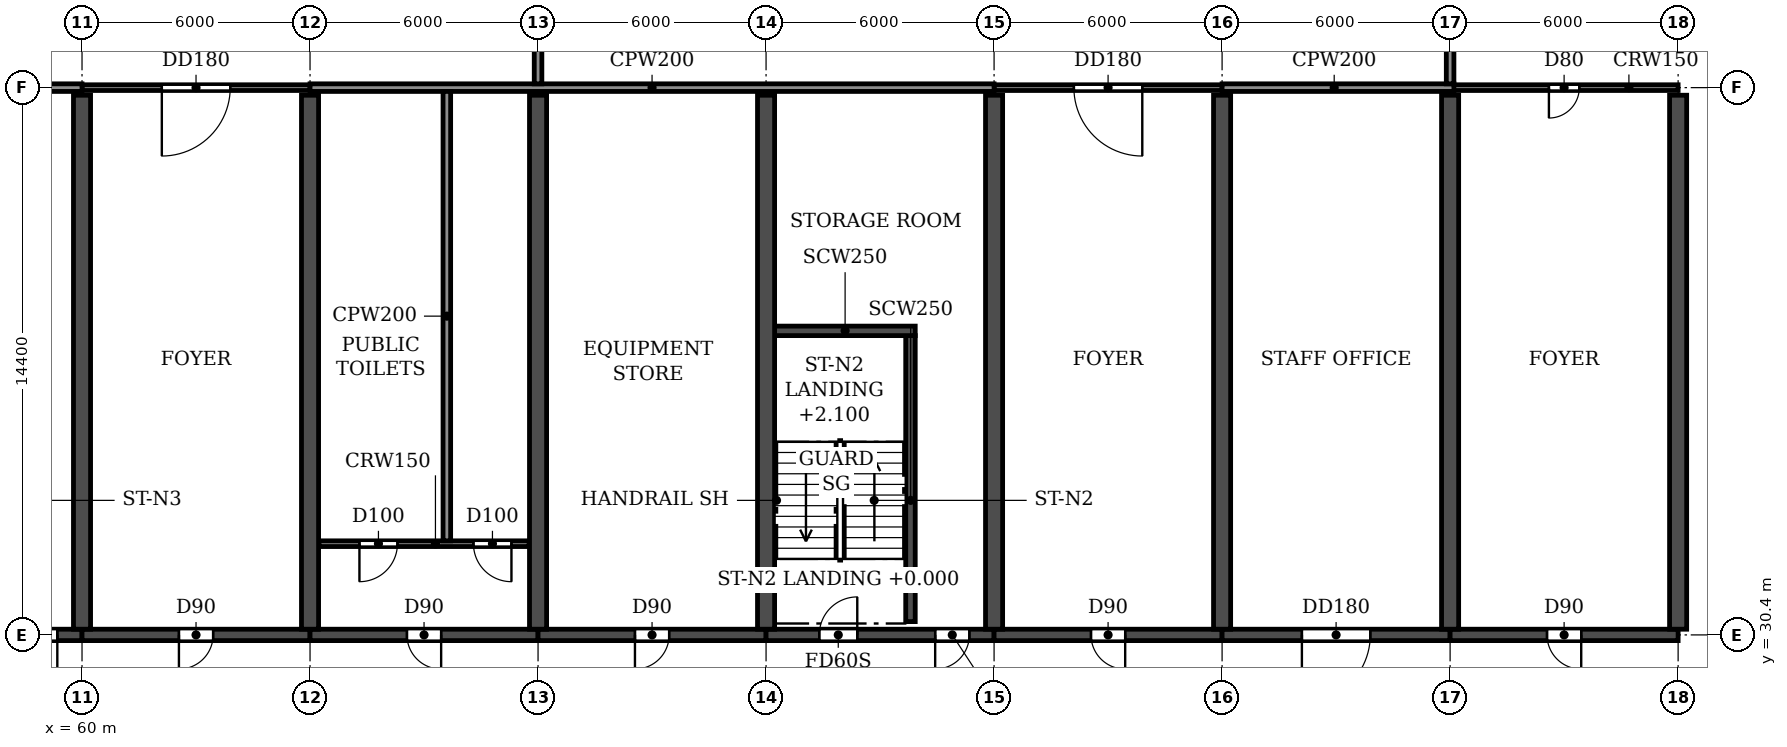
"""IFC4 building model, lengths in metres.
Left out: names, types, materials, properties, quantities, classifications, styles, units other than length and angle.
Written with IfcOpenShell. Run it as: python <this file> out.ifc"""

import sys

from ifc_helpers import new_model, si_unit, direction, frame, frame_2d, origin, place, context, subcontext, project, spatial, rectangle, extrude, element, fill, save


model = new_model("IFC4")
c1 = context("Model", 3, precision=1e-05, world=origin(), true_north=direction((0.0, 1.0)))
c2 = subcontext(c1, "Body", "Model", "MODEL_VIEW")
j1 = project(units=[si_unit("LENGTHUNIT", "METRE"), si_unit("PLANEANGLEUNIT", "RADIAN")], contexts=[c1])
p1 = place(None, origin())
s1 = spatial("IfcSite", under=j1, at=p1, CompositionType="ELEMENT")
p2 = place(p1, origin())
s2 = spatial("IfcBuilding", under=s1, at=p2, CompositionType="ELEMENT")
p3 = place(p2, frame((0.0, 0.0, 10.8)))
s3 = spatial("IfcBuildingStorey", under=s2, at=p3, CompositionType="ELEMENT", Elevation=10.8)
for number, where, z_axis, x_axis in (
    (1, (60.0, 30.55, 0.0), (0.0, 0.0, 1.0), (0.0, 1.0, 0.0)),
    (2, (66.0, 30.55, 0.0), (0.0, 0.0, 1.0), (0.0, 1.0, 0.0)),
    (3, (72.0, 30.55, 0.0), (0.0, 0.0, 1.0), (0.0, 1.0, 0.0)),
    (4, (78.0, 30.55, 0.0), (0.0, 0.0, 1.0), (0.0, 1.0, 0.0)),
    (5, (84.0, 30.55, 0.0), (0.0, 0.0, 1.0), (0.0, 1.0, 0.0)),
    (6, (90.0, 30.55, 0.0), (0.0, 0.0, 1.0), (0.0, 1.0, 0.0)),
    (7, (96.0, 30.55, 0.0), (0.0, 0.0, 1.0), (0.0, 1.0, 0.0)),
    (8, (102.0, 30.55, 0.0), (0.0, 0.0, 1.0), (0.0, 1.0, 0.0)),
):
    element("IfcWall", number, at=place(p3, frame(where, z_axis=z_axis, x_axis=x_axis)), inside=s3, PredefinedType="SHEAR", context=c2, shape_type="SweptSolid", body=[
        extrude(rectangle(XDim=14.05, YDim=0.45, at=frame_2d((7.025, 0.0))), origin(), (0.0, 0.0, 1.0), 3.92),
    ])
p4 = place(p3, frame((54.0, 30.4, 0.0), z_axis=(0.0, 0.0, 1.0), x_axis=(1.0, 0.0, 0.0)))
e9 = element("IfcWall", 9, at=p4, inside=s3, PredefinedType="SHEAR", context=c2, shape_type="SweptSolid", body=[
    extrude(rectangle(XDim=6.0, YDim=0.3, at=frame_2d((3.0, 0.0))), origin(), (0.0, 0.0, 1.0), 3.32),
])
p5 = place(p4, frame((1.4, 0.0, 0.0)))
e10 = element("IfcOpeningElement", 10, at=p5, cuts=e9, PredefinedType="OPENING", context=c2, shape_type="SweptSolid", body=[
    extrude(rectangle(XDim=1.0, YDim=2.1, at=frame_2d((0.5, 1.05))), frame((0.0, 0.16, 0.0), z_axis=(0.0, -1.0, 0.0), x_axis=(1.0, 0.0, 0.0)), (0.0, 0.0, 1.0), 0.32),
])
p6 = place(p4, frame((4.45, 0.0, 0.0)))
e11 = element("IfcOpeningElement", 11, at=p6, cuts=e9, PredefinedType="OPENING", context=c2, shape_type="SweptSolid", body=[
    extrude(rectangle(XDim=0.9, YDim=2.1, at=frame_2d((0.45, 1.05))), frame((0.0, 0.16, 0.0), z_axis=(0.0, -1.0, 0.0), x_axis=(1.0, 0.0, 0.0)), (0.0, 0.0, 1.0), 0.32),
])
p7 = place(p3, frame((60.0, 30.4, 0.0), z_axis=(0.0, 0.0, 1.0), x_axis=(1.0, 0.0, 0.0)))
e12 = element("IfcWall", 12, at=p7, inside=s3, PredefinedType="SHEAR", context=c2, shape_type="SweptSolid", body=[
    extrude(rectangle(XDim=6.0, YDim=0.3, at=frame_2d((3.0, 0.0))), origin(), (0.0, 0.0, 1.0), 3.32),
])
p8 = place(p7, frame((2.55, 0.0, 0.0)))
e13 = element("IfcOpeningElement", 13, at=p8, cuts=e12, PredefinedType="OPENING", context=c2, shape_type="SweptSolid", body=[
    extrude(rectangle(XDim=0.9, YDim=2.1, at=frame_2d((0.45, 1.05))), frame((0.0, 0.16, 0.0), z_axis=(0.0, -1.0, 0.0), x_axis=(1.0, 0.0, 0.0)), (0.0, 0.0, 1.0), 0.32),
])
p9 = place(p3, frame((66.0, 30.4, 0.0), z_axis=(0.0, 0.0, 1.0), x_axis=(1.0, 0.0, 0.0)))
e14 = element("IfcWall", 14, at=p9, inside=s3, PredefinedType="SHEAR", context=c2, shape_type="SweptSolid", body=[
    extrude(rectangle(XDim=6.0, YDim=0.3, at=frame_2d((3.0, 0.0))), origin(), (0.0, 0.0, 1.0), 3.32),
])
p10 = place(p9, frame((2.55, 0.0, 0.0)))
e15 = element("IfcOpeningElement", 15, at=p10, cuts=e14, PredefinedType="OPENING", context=c2, shape_type="SweptSolid", body=[
    extrude(rectangle(XDim=0.9, YDim=2.1, at=frame_2d((0.45, 1.05))), frame((0.0, 0.16, 0.0), z_axis=(0.0, -1.0, 0.0), x_axis=(1.0, 0.0, 0.0)), (0.0, 0.0, 1.0), 0.32),
])
p11 = place(p3, frame((72.0, 30.4, 0.0), z_axis=(0.0, 0.0, 1.0), x_axis=(1.0, 0.0, 0.0)))
e16 = element("IfcWall", 16, at=p11, inside=s3, PredefinedType="SHEAR", context=c2, shape_type="SweptSolid", body=[
    extrude(rectangle(XDim=6.0, YDim=0.3, at=frame_2d((3.0, 0.0))), origin(), (0.0, 0.0, 1.0), 3.32),
])
p12 = place(p11, frame((2.55, 0.0, 0.0)))
e17 = element("IfcOpeningElement", 17, at=p12, cuts=e16, PredefinedType="OPENING", context=c2, shape_type="SweptSolid", body=[
    extrude(rectangle(XDim=0.9, YDim=2.1, at=frame_2d((0.45, 1.05))), frame((0.0, 0.16, 0.0), z_axis=(0.0, -1.0, 0.0), x_axis=(1.0, 0.0, 0.0)), (0.0, 0.0, 1.0), 0.32),
])
p13 = place(p3, frame((78.0, 30.4, 0.0), z_axis=(0.0, 0.0, 1.0), x_axis=(1.0, 0.0, 0.0)))
e18 = element("IfcWall", 18, at=p13, inside=s3, PredefinedType="SHEAR", context=c2, shape_type="SweptSolid", body=[
    extrude(rectangle(XDim=6.0, YDim=0.3, at=frame_2d((3.0, 0.0))), origin(), (0.0, 0.0, 1.0), 3.32),
])
p14 = place(p13, frame((1.4, 0.0, 0.0)))
e19 = element("IfcOpeningElement", 19, at=p14, cuts=e18, PredefinedType="OPENING", context=c2, shape_type="SweptSolid", body=[
    extrude(rectangle(XDim=1.0, YDim=2.1, at=frame_2d((0.5, 1.05))), frame((0.0, 0.16, 0.0), z_axis=(0.0, -1.0, 0.0), x_axis=(1.0, 0.0, 0.0)), (0.0, 0.0, 1.0), 0.32),
])
p15 = place(p13, frame((4.45, 0.0, 0.0)))
e20 = element("IfcOpeningElement", 20, at=p15, cuts=e18, PredefinedType="OPENING", context=c2, shape_type="SweptSolid", body=[
    extrude(rectangle(XDim=0.9, YDim=2.1, at=frame_2d((0.45, 1.05))), frame((0.0, 0.16, 0.0), z_axis=(0.0, -1.0, 0.0), x_axis=(1.0, 0.0, 0.0)), (0.0, 0.0, 1.0), 0.32),
])
p16 = place(p3, frame((84.0, 30.4, 0.0), z_axis=(0.0, 0.0, 1.0), x_axis=(1.0, 0.0, 0.0)))
e21 = element("IfcWall", 21, at=p16, inside=s3, PredefinedType="SHEAR", context=c2, shape_type="SweptSolid", body=[
    extrude(rectangle(XDim=6.0, YDim=0.3, at=frame_2d((3.0, 0.0))), origin(), (0.0, 0.0, 1.0), 3.32),
])
p17 = place(p16, frame((2.55, 0.0, 0.0)))
e22 = element("IfcOpeningElement", 22, at=p17, cuts=e21, PredefinedType="OPENING", context=c2, shape_type="SweptSolid", body=[
    extrude(rectangle(XDim=0.9, YDim=2.1, at=frame_2d((0.45, 1.05))), frame((0.0, 0.16, 0.0), z_axis=(0.0, -1.0, 0.0), x_axis=(1.0, 0.0, 0.0)), (0.0, 0.0, 1.0), 0.32),
])
p18 = place(p3, frame((90.0, 30.4, 0.0), z_axis=(0.0, 0.0, 1.0), x_axis=(1.0, 0.0, 0.0)))
e23 = element("IfcWall", 23, at=p18, inside=s3, PredefinedType="SHEAR", context=c2, shape_type="SweptSolid", body=[
    extrude(rectangle(XDim=6.0, YDim=0.3, at=frame_2d((3.0, 0.0))), origin(), (0.0, 0.0, 1.0), 3.32),
])
p19 = place(p18, frame((2.1, 0.0, 0.0)))
e24 = element("IfcOpeningElement", 24, at=p19, cuts=e23, PredefinedType="OPENING", context=c2, shape_type="SweptSolid", body=[
    extrude(rectangle(XDim=1.8, YDim=2.1, at=frame_2d((0.9, 1.05))), frame((0.0, 0.16, 0.0), z_axis=(0.0, -1.0, 0.0), x_axis=(1.0, 0.0, 0.0)), (0.0, 0.0, 1.0), 0.32),
])
p20 = place(p3, frame((96.0, 30.4, 0.0), z_axis=(0.0, 0.0, 1.0), x_axis=(1.0, 0.0, 0.0)))
e25 = element("IfcWall", 25, at=p20, inside=s3, PredefinedType="SHEAR", context=c2, shape_type="SweptSolid", body=[
    extrude(rectangle(XDim=6.0, YDim=0.3, at=frame_2d((3.0, 0.0))), origin(), (0.0, 0.0, 1.0), 3.32),
])
p21 = place(p20, frame((2.55, 0.0, 0.0)))
e26 = element("IfcOpeningElement", 26, at=p21, cuts=e25, PredefinedType="OPENING", context=c2, shape_type="SweptSolid", body=[
    extrude(rectangle(XDim=0.9, YDim=2.1, at=frame_2d((0.45, 1.05))), frame((0.0, 0.16, 0.0), z_axis=(0.0, -1.0, 0.0), x_axis=(1.0, 0.0, 0.0)), (0.0, 0.0, 1.0), 0.32),
])
p22 = place(p3, frame((81.8, 30.75, 0.0), z_axis=(0.0, 0.0, 1.0), x_axis=(0.0, 1.0, 0.0)))
e27 = element("IfcWall", 27, at=p22, inside=s3, PredefinedType="SOLIDWALL", context=c2, shape_type="SweptSolid", body=[
    extrude(rectangle(XDim=7.525, YDim=0.25, at=frame_2d((3.762, 0.0))), origin(), (0.0, 0.0, 1.0), 3.92),
])
p23 = place(p3, frame((78.0, 38.4, 0.0), z_axis=(0.0, 0.0, 1.0), x_axis=(1.0, 0.0, 0.0)))
e28 = element("IfcWall", 28, at=p23, inside=s3, PredefinedType="SOLIDWALL", context=c2, shape_type="SweptSolid", body=[
    extrude(rectangle(XDim=3.925, YDim=0.25, at=frame_2d((1.962, 0.0))), origin(), (0.0, 0.0, 1.0), 3.92),
])
p24 = place(p3, frame((66.235, 32.8, 0.0), z_axis=(0.0, 0.0, 1.0), x_axis=(1.0, 0.0, 0.0)))
e29 = element("IfcWall", 29, at=p24, inside=s3, PredefinedType="PARTITIONING", context=c2, shape_type="SweptSolid", body=[
    extrude(rectangle(XDim=5.53, YDim=0.15, at=frame_2d((2.765, 0.0))), origin(), (0.0, 0.0, 1.0), 3.92),
])
p25 = place(p24, frame((1.065, 0.0, 0.0)))
e30 = element("IfcOpeningElement", 30, at=p25, cuts=e29, PredefinedType="OPENING", context=c2, shape_type="SweptSolid", body=[
    extrude(rectangle(XDim=1.0, YDim=2.1, at=frame_2d((0.5, 1.05))), frame((0.0, 0.085, 0.0), z_axis=(0.0, -1.0, 0.0), x_axis=(1.0, 0.0, 0.0)), (0.0, 0.0, 1.0), 0.17),
])
p26 = place(p24, frame((4.065, 0.0, 0.0)))
e31 = element("IfcOpeningElement", 31, at=p26, cuts=e29, PredefinedType="OPENING", context=c2, shape_type="SweptSolid", body=[
    extrude(rectangle(XDim=1.0, YDim=2.1, at=frame_2d((0.5, 1.05))), frame((0.0, 0.085, 0.0), z_axis=(0.0, -1.0, 0.0), x_axis=(1.0, 0.0, 0.0)), (0.0, 0.0, 1.0), 0.17),
])
p27 = place(p3, frame((60.0, 44.8, 0.0), z_axis=(0.0, 0.0, 1.0), x_axis=(1.0, 0.0, 0.0)))
e32 = element("IfcWall", 32, at=p27, inside=s3, PredefinedType="PARTITIONING", context=c2, shape_type="SweptSolid", body=[
    extrude(rectangle(XDim=6.0, YDim=0.15, at=frame_2d((3.0, 0.0))), origin(), (0.0, 0.0, 1.0), 3.92),
])
p28 = place(p27, frame((2.1, 0.0, 0.0)))
e33 = element("IfcOpeningElement", 33, at=p28, cuts=e32, PredefinedType="OPENING", context=c2, shape_type="SweptSolid", body=[
    extrude(rectangle(XDim=1.8, YDim=2.1, at=frame_2d((0.9, 1.05))), frame((0.0, 0.085, 0.0), z_axis=(0.0, -1.0, 0.0), x_axis=(1.0, 0.0, 0.0)), (0.0, 0.0, 1.0), 0.17),
])
p29 = place(p3, frame((84.0, 44.8, 0.0), z_axis=(0.0, 0.0, 1.0), x_axis=(1.0, 0.0, 0.0)))
e34 = element("IfcWall", 34, at=p29, inside=s3, PredefinedType="PARTITIONING", context=c2, shape_type="SweptSolid", body=[
    extrude(rectangle(XDim=6.0, YDim=0.15, at=frame_2d((3.0, 0.0))), origin(), (0.0, 0.0, 1.0), 3.92),
])
p30 = place(p29, frame((2.1, 0.0, 0.0)))
e35 = element("IfcOpeningElement", 35, at=p30, cuts=e34, PredefinedType="OPENING", context=c2, shape_type="SweptSolid", body=[
    extrude(rectangle(XDim=1.8, YDim=2.1, at=frame_2d((0.9, 1.05))), frame((0.0, 0.085, 0.0), z_axis=(0.0, -1.0, 0.0), x_axis=(1.0, 0.0, 0.0)), (0.0, 0.0, 1.0), 0.17),
])
p31 = place(p3, frame((95.9, 44.8, 0.0), z_axis=(0.0, 0.0, 1.0), x_axis=(1.0, 0.0, 0.0)))
e36 = element("IfcWall", 36, at=p31, inside=s3, PredefinedType="PARTITIONING", context=c2, shape_type="SweptSolid", body=[
    extrude(rectangle(XDim=6.1, YDim=0.15, at=frame_2d((3.05, 0.0))), origin(), (0.0, 0.0, 1.0), 3.92),
])
p32 = place(p31, frame((2.7, 0.0, 0.0)))
e37 = element("IfcOpeningElement", 37, at=p32, cuts=e36, PredefinedType="OPENING", context=c2, shape_type="SweptSolid", body=[
    extrude(rectangle(XDim=0.8, YDim=2.1, at=frame_2d((0.4, 1.05))), frame((0.0, 0.085, 0.0), z_axis=(0.0, -1.0, 0.0), x_axis=(1.0, 0.0, 0.0)), (0.0, 0.0, 1.0), 0.17),
])
p33 = place(p3, frame((36.0, 44.8, 0.0), z_axis=(0.0, 0.0, 1.0), x_axis=(1.0, 0.0, 0.0)))
e38 = element("IfcWall", 38, at=p33, inside=s3, PredefinedType="PARTITIONING", context=c2, shape_type="SweptSolid", body=[
    extrude(rectangle(XDim=24.0, YDim=0.2, at=frame_2d((12.0, 0.0))), origin(), (0.0, 0.0, 1.0), 3.92),
])
p34 = place(p3, frame((66.0, 44.8, 0.0), z_axis=(0.0, 0.0, 1.0), x_axis=(1.0, 0.0, 0.0)))
e39 = element("IfcWall", 39, at=p34, inside=s3, PredefinedType="PARTITIONING", context=c2, shape_type="SweptSolid", body=[
    extrude(rectangle(XDim=18.0, YDim=0.2, at=frame_2d((9.0, 0.0))), origin(), (0.0, 0.0, 1.0), 3.92),
])
p35 = place(p3, frame((90.0, 44.8, 0.0), z_axis=(0.0, 0.0, 1.0), x_axis=(1.0, 0.0, 0.0)))
e40 = element("IfcWall", 40, at=p35, inside=s3, PredefinedType="PARTITIONING", context=c2, shape_type="SweptSolid", body=[
    extrude(rectangle(XDim=6.1, YDim=0.2, at=frame_2d((3.05, 0.0))), origin(), (0.0, 0.0, 1.0), 3.92),
])
p36 = place(p3, frame((69.6, 32.875, 0.0), z_axis=(0.0, 0.0, 1.0), x_axis=(0.0, 1.0, 0.0)))
e41 = element("IfcWall", 41, at=p36, inside=s3, PredefinedType="PARTITIONING", context=c2, shape_type="SweptSolid", body=[
    extrude(rectangle(XDim=11.825, YDim=0.2, at=frame_2d((5.913, 0.0))), origin(), (0.0, 0.0, 1.0), 3.92),
])
for number, where, z_axis, x_axis in (
    (42, (72.0, 44.9, 0.0), (0.0, 0.0, 1.0), (0.0, 1.0, 0.0)),
    (43, (96.0, 44.9, 0.0), (0.0, 0.0, 1.0), (0.0, 1.0, 0.0)),
):
    element("IfcWall", number, at=place(p3, frame(where, z_axis=z_axis, x_axis=x_axis)), inside=s3, PredefinedType="PARTITIONING", context=c2, shape_type="SweptSolid", body=[
        extrude(rectangle(XDim=17.84, YDim=0.2, at=frame_2d((8.92, 0.0))), origin(), (0.0, 0.0, 1.0), 3.92),
    ])
p37 = place(p6, frame((0.9, 0.0, 0.0), z_axis=(0.0, 0.0, 1.0), x_axis=(-1.0, 0.0, 0.0)))
e44 = element("IfcDoor", 44, at=p37, inside=s3, OperationType="SINGLE_SWING_LEFT", PredefinedType="DOOR", context=c2, shape_type="SweptSolid", body=[
    extrude(rectangle(XDim=0.9, YDim=2.1, at=frame_2d((0.45, 1.05))), frame((0.0, 0.025, 0.0), z_axis=(0.0, -1.0, 0.0), x_axis=(1.0, 0.0, 0.0)), (0.0, 0.0, 1.0), 0.05),
])
fill(e11, e44)
p38 = place(p8, frame((0.9, 0.0, 0.0), z_axis=(0.0, 0.0, 1.0), x_axis=(-1.0, 0.0, 0.0)))
e45 = element("IfcDoor", 45, at=p38, inside=s3, OperationType="SINGLE_SWING_RIGHT", PredefinedType="DOOR", context=c2, shape_type="SweptSolid", body=[
    extrude(rectangle(XDim=0.9, YDim=2.1, at=frame_2d((0.45, 1.05))), frame((0.0, 0.025, 0.0), z_axis=(0.0, -1.0, 0.0), x_axis=(1.0, 0.0, 0.0)), (0.0, 0.0, 1.0), 0.05),
])
fill(e13, e45)
p39 = place(p10, frame((0.9, 0.0, 0.0), z_axis=(0.0, 0.0, 1.0), x_axis=(-1.0, 0.0, 0.0)))
e46 = element("IfcDoor", 46, at=p39, inside=s3, OperationType="SINGLE_SWING_LEFT", PredefinedType="DOOR", context=c2, shape_type="SweptSolid", body=[
    extrude(rectangle(XDim=0.9, YDim=2.1, at=frame_2d((0.45, 1.05))), frame((0.0, 0.025, 0.0), z_axis=(0.0, -1.0, 0.0), x_axis=(1.0, 0.0, 0.0)), (0.0, 0.0, 1.0), 0.05),
])
fill(e15, e46)
p40 = place(p12, frame((0.9, 0.0, 0.0), z_axis=(0.0, 0.0, 1.0), x_axis=(-1.0, 0.0, 0.0)))
e47 = element("IfcDoor", 47, at=p40, inside=s3, OperationType="SINGLE_SWING_RIGHT", PredefinedType="DOOR", context=c2, shape_type="SweptSolid", body=[
    extrude(rectangle(XDim=0.9, YDim=2.1, at=frame_2d((0.45, 1.05))), frame((0.0, 0.025, 0.0), z_axis=(0.0, -1.0, 0.0), x_axis=(1.0, 0.0, 0.0)), (0.0, 0.0, 1.0), 0.05),
])
fill(e17, e47)
p41 = place(p14, origin())
e48 = element("IfcDoor", 48, at=p41, inside=s3, OperationType="SINGLE_SWING_RIGHT", PredefinedType="DOOR", context=c2, shape_type="SweptSolid", body=[
    extrude(rectangle(XDim=1.0, YDim=2.1, at=frame_2d((0.5, 1.05))), frame((0.0, 0.025, 0.0), z_axis=(0.0, -1.0, 0.0), x_axis=(1.0, 0.0, 0.0)), (0.0, 0.0, 1.0), 0.05),
])
fill(e19, e48)
p42 = place(p15, frame((0.9, 0.0, 0.0), z_axis=(0.0, 0.0, 1.0), x_axis=(-1.0, 0.0, 0.0)))
e49 = element("IfcDoor", 49, at=p42, inside=s3, OperationType="SINGLE_SWING_RIGHT", PredefinedType="DOOR", context=c2, shape_type="SweptSolid", body=[
    extrude(rectangle(XDim=0.9, YDim=2.1, at=frame_2d((0.45, 1.05))), frame((0.0, 0.025, 0.0), z_axis=(0.0, -1.0, 0.0), x_axis=(1.0, 0.0, 0.0)), (0.0, 0.0, 1.0), 0.05),
])
fill(e20, e49)
p43 = place(p17, frame((0.9, 0.0, 0.0), z_axis=(0.0, 0.0, 1.0), x_axis=(-1.0, 0.0, 0.0)))
e50 = element("IfcDoor", 50, at=p43, inside=s3, OperationType="SINGLE_SWING_LEFT", PredefinedType="DOOR", context=c2, shape_type="SweptSolid", body=[
    extrude(rectangle(XDim=0.9, YDim=2.1, at=frame_2d((0.45, 1.05))), frame((0.0, 0.025, 0.0), z_axis=(0.0, -1.0, 0.0), x_axis=(1.0, 0.0, 0.0)), (0.0, 0.0, 1.0), 0.05),
])
fill(e22, e50)
p44 = place(p19, frame((1.8, 0.0, 0.0), z_axis=(0.0, 0.0, 1.0), x_axis=(-1.0, 0.0, 0.0)))
e51 = element("IfcDoor", 51, at=p44, inside=s3, OperationType="DOUBLE_DOOR_SINGLE_SWING", PredefinedType="DOOR", context=c2, shape_type="SweptSolid", body=[
    extrude(rectangle(XDim=1.8, YDim=2.1, at=frame_2d((0.9, 1.05))), frame((0.0, 0.025, 0.0), z_axis=(0.0, -1.0, 0.0), x_axis=(1.0, 0.0, 0.0)), (0.0, 0.0, 1.0), 0.05),
])
fill(e24, e51)
p45 = place(p21, frame((0.9, 0.0, 0.0), z_axis=(0.0, 0.0, 1.0), x_axis=(-1.0, 0.0, 0.0)))
e52 = element("IfcDoor", 52, at=p45, inside=s3, OperationType="SINGLE_SWING_LEFT", PredefinedType="DOOR", context=c2, shape_type="SweptSolid", body=[
    extrude(rectangle(XDim=0.9, YDim=2.1, at=frame_2d((0.45, 1.05))), frame((0.0, 0.025, 0.0), z_axis=(0.0, -1.0, 0.0), x_axis=(1.0, 0.0, 0.0)), (0.0, 0.0, 1.0), 0.05),
])
fill(e26, e52)
p46 = place(p25, frame((1.0, 0.0, 0.0), z_axis=(0.0, 0.0, 1.0), x_axis=(-1.0, 0.0, 0.0)))
e53 = element("IfcDoor", 53, at=p46, inside=s3, OperationType="SINGLE_SWING_RIGHT", PredefinedType="DOOR", context=c2, shape_type="SweptSolid", body=[
    extrude(rectangle(XDim=1.0, YDim=2.1, at=frame_2d((0.5, 1.05))), frame((0.0, 0.025, 0.0), z_axis=(0.0, -1.0, 0.0), x_axis=(1.0, 0.0, 0.0)), (0.0, 0.0, 1.0), 0.05),
])
fill(e30, e53)
p47 = place(p26, frame((1.0, 0.0, 0.0), z_axis=(0.0, 0.0, 1.0), x_axis=(-1.0, 0.0, 0.0)))
e54 = element("IfcDoor", 54, at=p47, inside=s3, OperationType="SINGLE_SWING_LEFT", PredefinedType="DOOR", context=c2, shape_type="SweptSolid", body=[
    extrude(rectangle(XDim=1.0, YDim=2.1, at=frame_2d((0.5, 1.05))), frame((0.0, 0.025, 0.0), z_axis=(0.0, -1.0, 0.0), x_axis=(1.0, 0.0, 0.0)), (0.0, 0.0, 1.0), 0.05),
])
fill(e31, e54)
p48 = place(p28, frame((1.8, 0.0, 0.0), z_axis=(0.0, 0.0, 1.0), x_axis=(-1.0, 0.0, 0.0)))
e55 = element("IfcDoor", 55, at=p48, inside=s3, OperationType="DOUBLE_DOOR_SINGLE_SWING", PredefinedType="DOOR", context=c2, shape_type="SweptSolid", body=[
    extrude(rectangle(XDim=1.8, YDim=2.1, at=frame_2d((0.9, 1.05))), frame((0.0, 0.025, 0.0), z_axis=(0.0, -1.0, 0.0), x_axis=(1.0, 0.0, 0.0)), (0.0, 0.0, 1.0), 0.05),
])
fill(e33, e55)
p49 = place(p30, frame((1.8, 0.0, 0.0), z_axis=(0.0, 0.0, 1.0), x_axis=(-1.0, 0.0, 0.0)))
e56 = element("IfcDoor", 56, at=p49, inside=s3, OperationType="DOUBLE_DOOR_SINGLE_SWING", PredefinedType="DOOR", context=c2, shape_type="SweptSolid", body=[
    extrude(rectangle(XDim=1.8, YDim=2.1, at=frame_2d((0.9, 1.05))), frame((0.0, 0.025, 0.0), z_axis=(0.0, -1.0, 0.0), x_axis=(1.0, 0.0, 0.0)), (0.0, 0.0, 1.0), 0.05),
])
fill(e35, e56)
p50 = place(p32, frame((0.8, 0.0, 0.0), z_axis=(0.0, 0.0, 1.0), x_axis=(-1.0, 0.0, 0.0)))
e57 = element("IfcDoor", 57, at=p50, inside=s3, OperationType="SINGLE_SWING_RIGHT", PredefinedType="DOOR", context=c2, shape_type="SweptSolid", body=[
    extrude(rectangle(XDim=0.8, YDim=2.1, at=frame_2d((0.4, 1.05))), frame((0.0, 0.025, 0.0), z_axis=(0.0, -1.0, 0.0), x_axis=(1.0, 0.0, 0.0)), (0.0, 0.0, 1.0), 0.05),
])
fill(e37, e57)
save(model, sys.argv[1])
